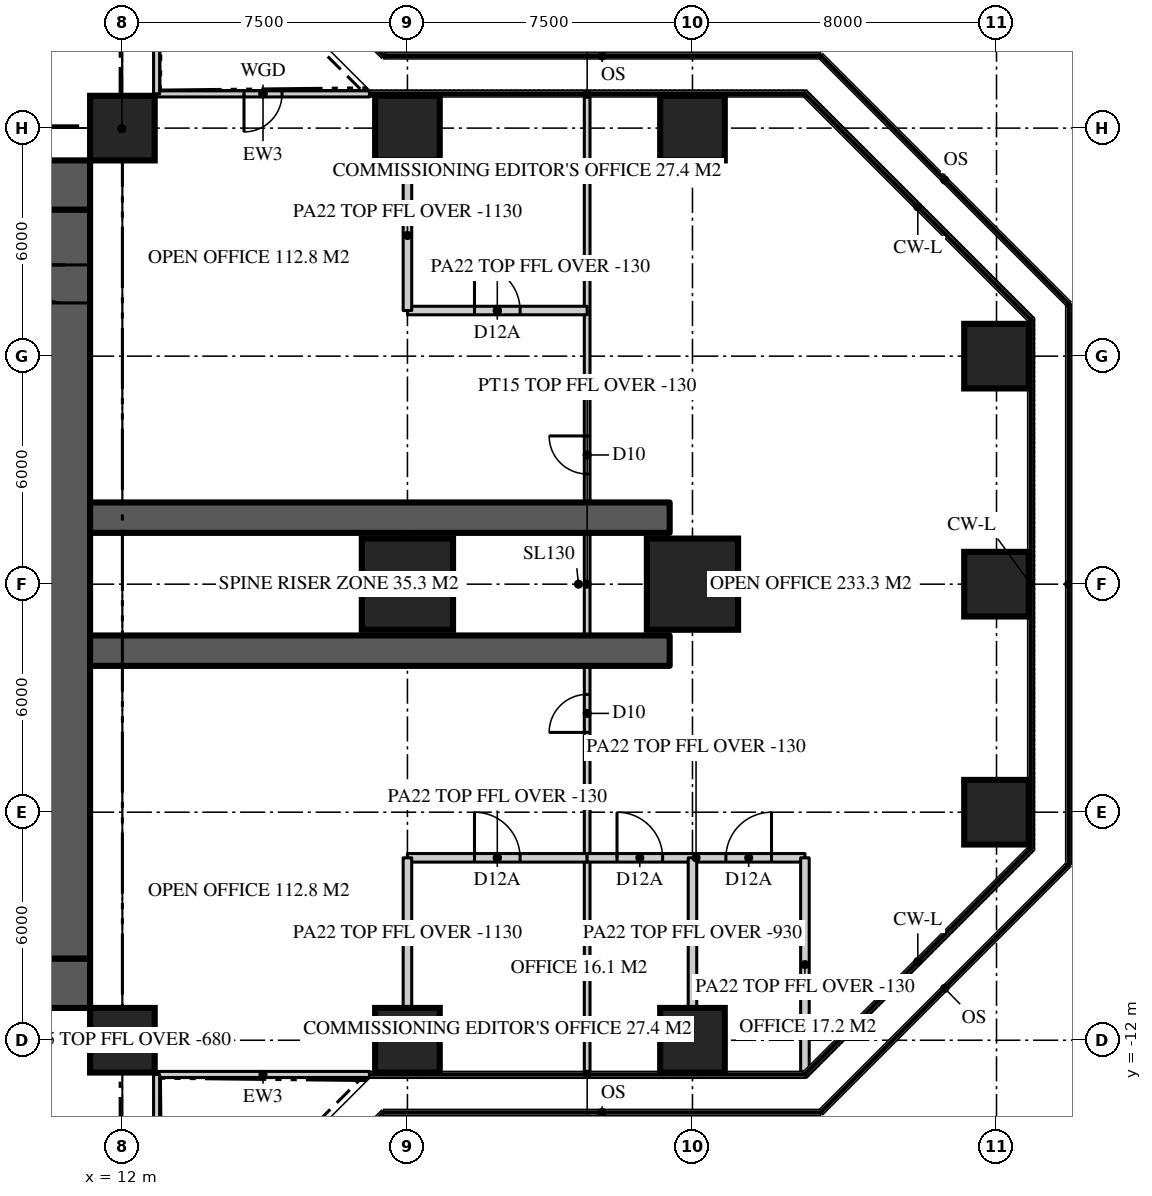
"""IFC4 building model, lengths in metres.
Left out: names, types, materials, properties, quantities, classifications, styles, units other than length and angle.
Written with IfcOpenShell. Run it as: python <this file> out.ifc"""

import sys

from ifc_helpers import new_model, si_unit, direction, frame, frame_2d, origin, origin_2d, place, context, subcontext, project, spatial, rectangle, extrude, element, fill, save


model = new_model("IFC4")
c1 = context("Model", 3, precision=1e-05, world=origin(), true_north=direction((0.0, 1.0)))
c2 = subcontext(c1, "Body", "Model", "MODEL_VIEW")
j1 = project(units=[si_unit("LENGTHUNIT", "METRE"), si_unit("PLANEANGLEUNIT", "RADIAN")], contexts=[c1])
p1 = place(None, origin())
s1 = spatial("IfcSite", under=j1, at=p1, CompositionType="ELEMENT")
p2 = place(p1, origin())
s2 = spatial("IfcBuilding", under=s1, at=p2, CompositionType="ELEMENT")
p3 = place(p2, frame((0.0, 0.0, 78.6)))
s3 = spatial("IfcBuildingStorey", under=s2, at=p3, CompositionType="ELEMENT", Elevation=78.6)
p4 = place(p3, frame((-11.15, 10.5, 0.0), z_axis=(0.0, 0.0, 1.0), x_axis=(1.0, 0.0, 0.0)))
e1 = element("IfcWall", 1, at=p4, inside=s3, PredefinedType="SHEAR", context=c2, shape_type="SweptSolid", body=[
    extrude(rectangle(XDim=22.3, YDim=1.3, at=frame_2d((11.15, 0.0))), origin(), (0.0, 0.0, 1.0), 3.9),
])
p5 = place(p4, frame((4.25, 0.0, 0.0)))
e2 = element("IfcOpeningElement", 2, at=p5, cuts=e1, PredefinedType="OPENING", context=c2, shape_type="SweptSolid", body=[
    extrude(rectangle(XDim=1.8, YDim=2.2, at=frame_2d((0.9, 1.1))), frame((0.0, 0.66, 0.0), z_axis=(0.0, -1.0, 0.0), x_axis=(1.0, 0.0, 0.0)), (0.0, 0.0, 1.0), 1.32),
])
p6 = place(p4, frame((16.25, 0.0, 0.0)))
e3 = element("IfcOpeningElement", 3, at=p6, cuts=e1, PredefinedType="OPENING", context=c2, shape_type="SweptSolid", body=[
    extrude(rectangle(XDim=1.8, YDim=2.2, at=frame_2d((0.9, 1.1))), frame((0.0, 0.66, 0.0), z_axis=(0.0, -1.0, 0.0), x_axis=(1.0, 0.0, 0.0)), (0.0, 0.0, 1.0), 1.32),
])
p7 = place(p3, frame((11.15, -10.5, 0.0), z_axis=(0.0, 0.0, 1.0), x_axis=(-1.0, 0.0, 0.0)))
e4 = element("IfcWall", 4, at=p7, inside=s3, PredefinedType="SHEAR", context=c2, shape_type="SweptSolid", body=[
    extrude(rectangle(XDim=22.3, YDim=1.3, at=frame_2d((11.15, 0.0))), origin(), (0.0, 0.0, 1.0), 3.9),
])
p8 = place(p7, frame((16.25, 0.0, 0.0)))
e5 = element("IfcOpeningElement", 5, at=p8, cuts=e4, PredefinedType="OPENING", context=c2, shape_type="SweptSolid", body=[
    extrude(rectangle(XDim=1.8, YDim=2.2, at=frame_2d((0.9, 1.1))), frame((0.0, 0.66, 0.0), z_axis=(0.0, -1.0, 0.0), x_axis=(1.0, 0.0, 0.0)), (0.0, 0.0, 1.0), 1.32),
])
p9 = place(p7, frame((4.25, 0.0, 0.0)))
e6 = element("IfcOpeningElement", 6, at=p9, cuts=e4, PredefinedType="OPENING", context=c2, shape_type="SweptSolid", body=[
    extrude(rectangle(XDim=1.8, YDim=2.2, at=frame_2d((0.9, 1.1))), frame((0.0, 0.66, 0.0), z_axis=(0.0, -1.0, 0.0), x_axis=(1.0, 0.0, 0.0)), (0.0, 0.0, 1.0), 1.32),
])
p10 = place(p3, frame((10.5, -9.85, 0.0), z_axis=(0.0, 0.0, 1.0), x_axis=(0.0, 1.0, 0.0)))
e7 = element("IfcWall", 7, at=p10, inside=s3, PredefinedType="SHEAR", context=c2, shape_type="SweptSolid", body=[
    extrude(rectangle(XDim=19.7, YDim=1.3, at=frame_2d((9.85, 0.0))), origin(), (0.0, 0.0, 1.0), 3.9),
])
p11 = place(p10, frame((17.25, 0.0, 0.0)))
e8 = element("IfcOpeningElement", 8, at=p11, cuts=e7, PredefinedType="OPENING", context=c2, shape_type="SweptSolid", body=[
    extrude(rectangle(XDim=1.0, YDim=2.2, at=frame_2d((0.5, 1.1))), frame((0.0, 0.66, 0.0), z_axis=(0.0, -1.0, 0.0), x_axis=(1.0, 0.0, 0.0)), (0.0, 0.0, 1.0), 1.32),
])
for number, where, z_axis, x_axis in (
    (9, (11.15, -1.75, 0.0), (0.0, 0.0, 1.0), (1.0, 0.0, 0.0)),
    (10, (11.15, 1.75, 0.0), (0.0, 0.0, 1.0), (1.0, 0.0, 0.0)),
):
    element("IfcWall", number, at=place(p3, frame(where, z_axis=z_axis, x_axis=x_axis)), inside=s3, PredefinedType="SHEAR", context=c2, shape_type="SweptSolid", body=[
        extrude(rectangle(XDim=15.25, YDim=0.8, at=frame_2d((7.625, 0.0))), origin(), (0.0, 0.0, 1.0), 3.9),
    ])
for number, where, z_axis, x_axis in (
    (11, (12.0, -12.0, 0.0), (0.0, 0.0, 1.0), (1.0, 0.0, 0.0)),
    (12, (19.5, -12.0, 0.0), (0.0, 0.0, 1.0), (1.0, 0.0, 0.0)),
    (13, (27.0, -12.0, 0.0), (0.0, 0.0, 1.0), (1.0, 0.0, 0.0)),
    (14, (35.0, -6.0, 0.0), (0.0, 0.0, 1.0), (1.0, 0.0, 0.0)),
):
    element("IfcColumn", number, at=place(p3, frame(where, z_axis=z_axis, x_axis=x_axis)), inside=s3, PredefinedType="COLUMN", context=c2, shape_type="SweptSolid", body=[
        extrude(rectangle(XDim=1.7, YDim=1.7, at=origin_2d()), origin(), (0.0, 0.0, 1.0), 3.9),
    ])
for number, where, z_axis, x_axis in (
    (15, (19.5, 0.0, 0.0), (0.0, 0.0, 1.0), (1.0, 0.0, 0.0)),
    (16, (27.0, 0.0, 0.0), (0.0, 0.0, 1.0), (1.0, 0.0, 0.0)),
):
    element("IfcColumn", number, at=place(p3, frame(where, z_axis=z_axis, x_axis=x_axis)), inside=s3, PredefinedType="COLUMN", context=c2, shape_type="SweptSolid", body=[
        extrude(rectangle(XDim=2.4, YDim=2.4, at=origin_2d()), origin(), (0.0, 0.0, 1.0), 3.9),
    ])
for number, where, z_axis, x_axis in (
    (17, (35.0, 0.0, 0.0), (0.0, 0.0, 1.0), (1.0, 0.0, 0.0)),
    (18, (35.0, 6.0, 0.0), (0.0, 0.0, 1.0), (1.0, 0.0, 0.0)),
    (19, (12.0, 12.0, 0.0), (0.0, 0.0, 1.0), (1.0, 0.0, 0.0)),
    (20, (19.5, 12.0, 0.0), (0.0, 0.0, 1.0), (1.0, 0.0, 0.0)),
    (21, (27.0, 12.0, 0.0), (0.0, 0.0, 1.0), (1.0, 0.0, 0.0)),
):
    element("IfcColumn", number, at=place(p3, frame(where, z_axis=z_axis, x_axis=x_axis)), inside=s3, PredefinedType="COLUMN", context=c2, shape_type="SweptSolid", body=[
        extrude(rectangle(XDim=1.7, YDim=1.7, at=origin_2d()), origin(), (0.0, 0.0, 1.0), 3.9),
    ])
p12 = place(p3, frame((12.9, -12.9, 0.0), z_axis=(0.0, 0.0, 1.0), x_axis=(1.0, 0.0, 0.0)))
e22 = element("IfcWall", 22, at=p12, inside=s3, PredefinedType="SOLIDWALL", context=c2, shape_type="SweptSolid", body=[
    extrude(rectangle(XDim=5.6, YDim=0.16, at=frame_2d((2.8, 0.0))), origin(), (0.0, 0.0, 1.0), 3.77),
])
p13 = place(p3, frame((18.5, 12.9, 0.0), z_axis=(0.0, 0.0, 1.0), x_axis=(-1.0, 0.0, 0.0)))
e23 = element("IfcWall", 23, at=p13, inside=s3, PredefinedType="SOLIDWALL", context=c2, shape_type="SweptSolid", body=[
    extrude(rectangle(XDim=5.6, YDim=0.16, at=frame_2d((2.8, 0.0))), origin(), (0.0, 0.0, 1.0), 3.77),
])
p14 = place(p13, frame((2.3, 0.0, 0.0)))
e24 = element("IfcOpeningElement", 24, at=p14, cuts=e23, PredefinedType="OPENING", context=c2, shape_type="SweptSolid", body=[
    extrude(rectangle(XDim=1.0, YDim=2.2, at=frame_2d((0.5, 1.1))), frame((0.0, 0.09, 0.0), z_axis=(0.0, -1.0, 0.0), x_axis=(1.0, 0.0, 0.0)), (0.0, 0.0, 1.0), 0.18),
])
p15 = place(p3, frame((12.9, 12.9, 0.0), z_axis=(0.0, 0.0, 1.0), x_axis=(0.0, 1.0, 0.0)))
e25 = element("IfcWall", 25, at=p15, inside=s3, PredefinedType="SOLIDWALL", context=c2, shape_type="SweptSolid", body=[
    extrude(rectangle(XDim=5.6, YDim=0.16, at=frame_2d((2.8, 0.0))), origin(), (0.0, 0.0, 1.0), 3.77),
])
p16 = place(p3, frame((12.9, -18.5, 0.0), z_axis=(0.0, 0.0, 1.0), x_axis=(0.0, 1.0, 0.0)))
e26 = element("IfcWall", 26, at=p16, inside=s3, PredefinedType="SOLIDWALL", context=c2, shape_type="SweptSolid", body=[
    extrude(rectangle(XDim=5.6, YDim=0.16, at=frame_2d((2.8, 0.0))), origin(), (0.0, 0.0, 1.0), 3.77),
])
p17 = place(p16, frame((2.3, 0.0, 0.0)))
e27 = element("IfcOpeningElement", 27, at=p17, cuts=e26, PredefinedType="OPENING", context=c2, shape_type="SweptSolid", body=[
    extrude(rectangle(XDim=1.0, YDim=2.2, at=frame_2d((0.5, 1.1))), frame((0.0, 0.09, 0.0), z_axis=(0.0, -1.0, 0.0), x_axis=(1.0, 0.0, 0.0)), (0.0, 0.0, 1.0), 0.18),
])
p18 = place(p3, frame((24.229, -12.82, 0.0), z_axis=(0.0, 0.0, 1.0), x_axis=(0.0, 1.0, 0.0)))
e28 = element("IfcWall", 28, at=p18, inside=s3, PredefinedType="PARTITIONING", context=c2, shape_type="SweptSolid", body=[
    extrude(rectangle(XDim=25.64, YDim=0.15, at=frame_2d((12.82, 0.0))), origin(), (0.0, 0.0, 1.0), 3.77),
])
p19 = place(p18, frame((15.72, 0.0, 0.0)))
e29 = element("IfcOpeningElement", 29, at=p19, cuts=e28, PredefinedType="OPENING", context=c2, shape_type="SweptSolid", body=[
    extrude(rectangle(XDim=1.0, YDim=2.2, at=frame_2d((0.5, 1.1))), frame((0.0, 0.085, 0.0), z_axis=(0.0, -1.0, 0.0), x_axis=(1.0, 0.0, 0.0)), (0.0, 0.0, 1.0), 0.17),
])
p20 = place(p18, frame((8.92, 0.0, 0.0)))
e30 = element("IfcOpeningElement", 30, at=p20, cuts=e28, PredefinedType="OPENING", context=c2, shape_type="SweptSolid", body=[
    extrude(rectangle(XDim=1.0, YDim=2.2, at=frame_2d((0.5, 1.1))), frame((0.0, 0.085, 0.0), z_axis=(0.0, -1.0, 0.0), x_axis=(1.0, 0.0, 0.0)), (0.0, 0.0, 1.0), 0.17),
])
p21 = place(p3, frame((19.5, 7.2, 0.0), z_axis=(0.0, 0.0, 1.0), x_axis=(1.0, 0.0, 0.0)))
e31 = element("IfcWall", 31, at=p21, inside=s3, PredefinedType="PARTITIONING", context=c2, shape_type="SweptSolid", body=[
    extrude(rectangle(XDim=4.729, YDim=0.225, at=frame_2d((2.365, 0.0))), origin(), (0.0, 0.0, 1.0), 3.77),
])
p22 = place(p21, frame((1.764, 0.0, 0.0)))
e32 = element("IfcOpeningElement", 32, at=p22, cuts=e31, PredefinedType="OPENING", context=c2, shape_type="SweptSolid", body=[
    extrude(rectangle(XDim=1.2, YDim=2.2, at=frame_2d((0.6, 1.1))), frame((0.0, 0.123, 0.0), z_axis=(0.0, -1.0, 0.0), x_axis=(1.0, 0.0, 0.0)), (0.0, 0.0, 1.0), 0.245),
])
p23 = place(p3, frame((19.5, 7.2, 0.0), z_axis=(0.0, 0.0, 1.0), x_axis=(0.0, 1.0, 0.0)))
e33 = element("IfcWall", 33, at=p23, inside=s3, PredefinedType="PARTITIONING", context=c2, shape_type="SweptSolid", body=[
    extrude(rectangle(XDim=3.95, YDim=0.225, at=frame_2d((1.975, 0.0))), origin(), (0.0, 0.0, 1.0), 2.77),
])
p24 = place(p3, frame((19.5, -7.2, 0.0), z_axis=(0.0, 0.0, 1.0), x_axis=(1.0, 0.0, 0.0)))
e34 = element("IfcWall", 34, at=p24, inside=s3, PredefinedType="PARTITIONING", context=c2, shape_type="SweptSolid", body=[
    extrude(rectangle(XDim=4.729, YDim=0.225, at=frame_2d((2.365, 0.0))), origin(), (0.0, 0.0, 1.0), 3.77),
])
p25 = place(p24, frame((1.764, 0.0, 0.0)))
e35 = element("IfcOpeningElement", 35, at=p25, cuts=e34, PredefinedType="OPENING", context=c2, shape_type="SweptSolid", body=[
    extrude(rectangle(XDim=1.2, YDim=2.2, at=frame_2d((0.6, 1.1))), frame((0.0, 0.123, 0.0), z_axis=(0.0, -1.0, 0.0), x_axis=(1.0, 0.0, 0.0)), (0.0, 0.0, 1.0), 0.245),
])
p26 = place(p3, frame((24.229, -7.2, 0.0), z_axis=(0.0, 0.0, 1.0), x_axis=(1.0, 0.0, 0.0)))
e36 = element("IfcWall", 36, at=p26, inside=s3, PredefinedType="PARTITIONING", context=c2, shape_type="SweptSolid", body=[
    extrude(rectangle(XDim=5.73, YDim=0.225, at=frame_2d((2.865, 0.0))), origin(), (0.0, 0.0, 1.0), 3.77),
])
p27 = place(p26, frame((0.785, 0.0, 0.0)))
e37 = element("IfcOpeningElement", 37, at=p27, cuts=e36, PredefinedType="OPENING", context=c2, shape_type="SweptSolid", body=[
    extrude(rectangle(XDim=1.2, YDim=2.2, at=frame_2d((0.6, 1.1))), frame((0.0, 0.123, 0.0), z_axis=(0.0, -1.0, 0.0), x_axis=(1.0, 0.0, 0.0)), (0.0, 0.0, 1.0), 0.245),
])
p28 = place(p26, frame((3.65, 0.0, 0.0)))
e38 = element("IfcOpeningElement", 38, at=p28, cuts=e36, PredefinedType="OPENING", context=c2, shape_type="SweptSolid", body=[
    extrude(rectangle(XDim=1.2, YDim=2.2, at=frame_2d((0.6, 1.1))), frame((0.0, 0.123, 0.0), z_axis=(0.0, -1.0, 0.0), x_axis=(1.0, 0.0, 0.0)), (0.0, 0.0, 1.0), 0.245),
])
p29 = place(p3, frame((19.5, -7.2, 0.0), z_axis=(0.0, 0.0, 1.0), x_axis=(0.0, -1.0, 0.0)))
e39 = element("IfcWall", 39, at=p29, inside=s3, PredefinedType="PARTITIONING", context=c2, shape_type="SweptSolid", body=[
    extrude(rectangle(XDim=3.95, YDim=0.225, at=frame_2d((1.975, 0.0))), origin(), (0.0, 0.0, 1.0), 2.77),
])
p30 = place(p3, frame((27.0, -7.2, 0.0), z_axis=(0.0, 0.0, 1.0), x_axis=(0.0, -1.0, 0.0)))
e40 = element("IfcWall", 40, at=p30, inside=s3, PredefinedType="PARTITIONING", context=c2, shape_type="SweptSolid", body=[
    extrude(rectangle(XDim=3.95, YDim=0.225, at=frame_2d((1.975, 0.0))), origin(), (0.0, 0.0, 1.0), 2.97),
])
p31 = place(p3, frame((29.959, -7.2, 0.0), z_axis=(0.0, 0.0, 1.0), x_axis=(0.0, -1.0, 0.0)))
e41 = element("IfcWall", 41, at=p31, inside=s3, PredefinedType="PARTITIONING", context=c2, shape_type="SweptSolid", body=[
    extrude(rectangle(XDim=5.62, YDim=0.225, at=frame_2d((2.81, 0.0))), origin(), (0.0, 0.0, 1.0), 3.77),
])
for number, where, z_axis, x_axis in (
    (42, (11.15, 11.15, 0.0), (0.0, 0.0, 1.0), (0.707, 0.707, 0.0)),
    (43, (11.15, -11.15, 0.0), (0.0, 0.0, 1.0), (0.707, -0.707, 0.0)),
):
    element("IfcWall", number, at=place(p3, frame(where, z_axis=z_axis, x_axis=x_axis)), inside=s3, PredefinedType="PARTITIONING", context=c2, shape_type="SweptSolid", body=[
        extrude(rectangle(XDim=2.362, YDim=0.15, at=frame_2d((1.181, 0.0))), origin(), (0.0, 0.0, 1.0), 3.22),
    ])
p32 = place(p14, origin())
e44 = element("IfcDoor", 44, at=p32, inside=s3, OperationType="SINGLE_SWING_RIGHT", PredefinedType="DOOR", context=c2, shape_type="SweptSolid", body=[
    extrude(rectangle(XDim=1.0, YDim=2.2, at=frame_2d((0.5, 1.1))), frame((0.0, 0.025, 0.0), z_axis=(0.0, -1.0, 0.0), x_axis=(1.0, 0.0, 0.0)), (0.0, 0.0, 1.0), 0.05),
])
fill(e24, e44)
p33 = place(p11, origin())
e45 = element("IfcDoor", 45, at=p33, inside=s3, OperationType="SINGLE_SWING_RIGHT", PredefinedType="DOOR", context=c2, shape_type="SweptSolid", body=[
    extrude(rectangle(XDim=1.0, YDim=2.2, at=frame_2d((0.5, 1.1))), frame((0.0, 0.025, 0.0), z_axis=(0.0, -1.0, 0.0), x_axis=(1.0, 0.0, 0.0)), (0.0, 0.0, 1.0), 0.05),
])
fill(e8, e45)
p34 = place(p19, origin())
e46 = element("IfcDoor", 46, at=p34, inside=s3, OperationType="SINGLE_SWING_RIGHT", PredefinedType="DOOR", context=c2, shape_type="SweptSolid", body=[
    extrude(rectangle(XDim=1.0, YDim=2.2, at=frame_2d((0.5, 1.1))), frame((0.0, 0.025, 0.0), z_axis=(0.0, -1.0, 0.0), x_axis=(1.0, 0.0, 0.0)), (0.0, 0.0, 1.0), 0.05),
])
fill(e29, e46)
p35 = place(p20, origin())
e47 = element("IfcDoor", 47, at=p35, inside=s3, OperationType="SINGLE_SWING_LEFT", PredefinedType="DOOR", context=c2, shape_type="SweptSolid", body=[
    extrude(rectangle(XDim=1.0, YDim=2.2, at=frame_2d((0.5, 1.1))), frame((0.0, 0.025, 0.0), z_axis=(0.0, -1.0, 0.0), x_axis=(1.0, 0.0, 0.0)), (0.0, 0.0, 1.0), 0.05),
])
fill(e30, e47)
p36 = place(p22, origin())
e48 = element("IfcDoor", 48, at=p36, inside=s3, OperationType="SINGLE_SWING_LEFT", PredefinedType="DOOR", context=c2, shape_type="SweptSolid", body=[
    extrude(rectangle(XDim=1.2, YDim=2.2, at=frame_2d((0.6, 1.1))), frame((0.0, 0.025, 0.0), z_axis=(0.0, -1.0, 0.0), x_axis=(1.0, 0.0, 0.0)), (0.0, 0.0, 1.0), 0.05),
])
fill(e32, e48)
p37 = place(p25, origin())
e49 = element("IfcDoor", 49, at=p37, inside=s3, OperationType="SINGLE_SWING_LEFT", PredefinedType="DOOR", context=c2, shape_type="SweptSolid", body=[
    extrude(rectangle(XDim=1.2, YDim=2.2, at=frame_2d((0.6, 1.1))), frame((0.0, 0.025, 0.0), z_axis=(0.0, -1.0, 0.0), x_axis=(1.0, 0.0, 0.0)), (0.0, 0.0, 1.0), 0.05),
])
fill(e35, e49)
p38 = place(p27, origin())
e50 = element("IfcDoor", 50, at=p38, inside=s3, OperationType="SINGLE_SWING_LEFT", PredefinedType="DOOR", context=c2, shape_type="SweptSolid", body=[
    extrude(rectangle(XDim=1.2, YDim=2.2, at=frame_2d((0.6, 1.1))), frame((0.0, 0.025, 0.0), z_axis=(0.0, -1.0, 0.0), x_axis=(1.0, 0.0, 0.0)), (0.0, 0.0, 1.0), 0.05),
])
fill(e37, e50)
p39 = place(p28, origin())
e51 = element("IfcDoor", 51, at=p39, inside=s3, OperationType="SINGLE_SWING_RIGHT", PredefinedType="DOOR", context=c2, shape_type="SweptSolid", body=[
    extrude(rectangle(XDim=1.2, YDim=2.2, at=frame_2d((0.6, 1.1))), frame((0.0, 0.025, 0.0), z_axis=(0.0, -1.0, 0.0), x_axis=(1.0, 0.0, 0.0)), (0.0, 0.0, 1.0), 0.05),
])
fill(e38, e51)
save(model, sys.argv[1])
